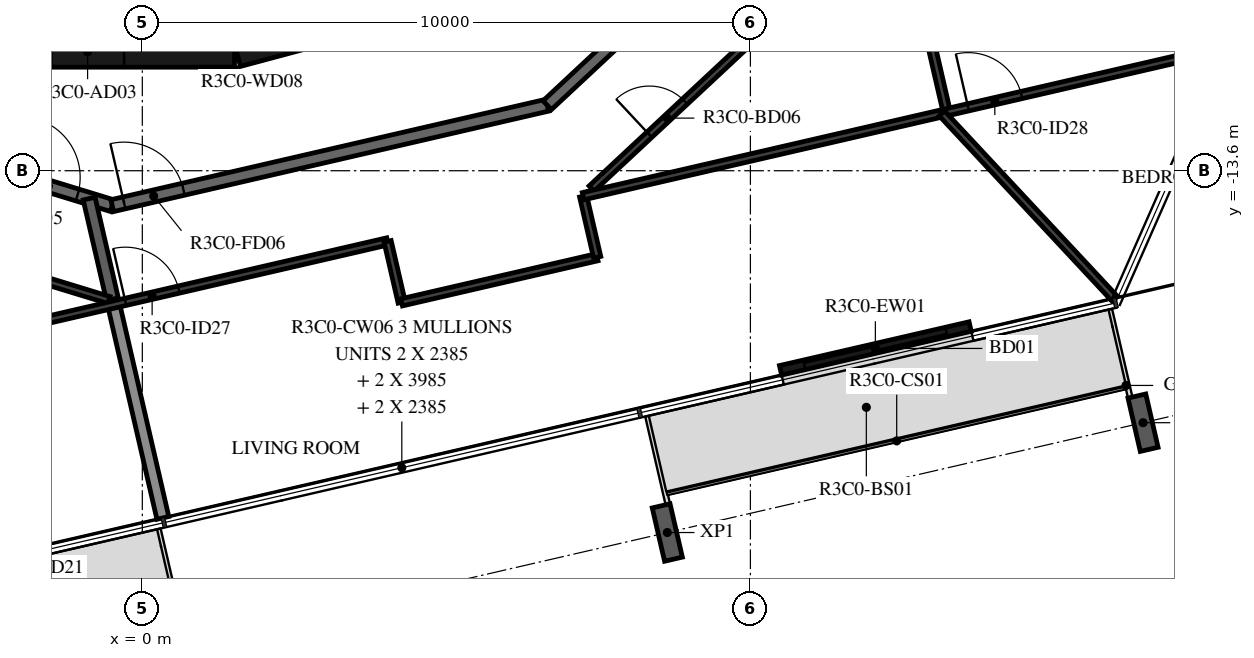
"""IFC4 building model, lengths in metres.
Left out: names, types, materials, properties, quantities, classifications, styles, units other than length and angle.
Written with IfcOpenShell. Run it as: python <this file> out.ifc"""

import sys

from ifc_helpers import new_model, si_unit, direction, frame, frame_2d, origin, origin_2d, place, context, subcontext, project, spatial, rectangle, i_section, extrude, element, fill, save


model = new_model("IFC4")
c1 = context("Model", 3, precision=1e-05, world=origin(), true_north=direction((0.0, 1.0)))
c2 = subcontext(c1, "Body", "Model", "MODEL_VIEW")
j1 = project(units=[si_unit("LENGTHUNIT", "METRE"), si_unit("PLANEANGLEUNIT", "RADIAN")], contexts=[c1])
p1 = place(None, origin())
s1 = spatial("IfcSite", under=j1, at=p1, CompositionType="ELEMENT")
p2 = place(p1, origin())
s2 = spatial("IfcBuilding", under=s1, at=p2, CompositionType="ELEMENT")
p3 = place(p2, frame((0.0, 0.0, 134.4)))
s3 = spatial("IfcBuildingStorey", under=s2, at=p3, CompositionType="ELEMENT", Elevation=134.4)
for number, where, z_axis, x_axis in (
    (1, (8.634, -19.55, -0.38), (0.0, 0.0, 1.0), (-0.974, -0.225, 0.0)),
    (2, (16.457, -17.744, -0.38), (0.0, 0.0, 1.0), (-0.974, -0.225, 0.0)),
):
    element("IfcColumn", number, at=place(p3, frame(where, z_axis=z_axis, x_axis=x_axis)), inside=s3, PredefinedType="COLUMN", context=c2, shape_type="SweptSolid", body=[
        extrude(i_section(OverallWidth=0.3, OverallDepth=0.9, WebThickness=0.019, FlangeThickness=0.035, FilletRadius=0.03, at=origin_2d()), origin(), (0.0, 0.0, 1.0), 3.5),
    ])
p4 = place(p3, frame((10.496, -16.883, 0.0), z_axis=(0.0, 0.0, 1.0), x_axis=(0.974364187477, 0.224976510247, 0.0)))
e3 = element("IfcWall", 3, at=p4, inside=s3, PredefinedType="STANDARD", context=c2, shape_type="SweptSolid", body=[
    extrude(rectangle(XDim=3.2, YDim=0.16, at=frame_2d((1.6, 0.0))), origin(), (0.0, 0.0, 1.0), 3.12),
])
p5 = place(p4, frame((0.4, 0.0, 0.0)))
e4 = element("IfcOpeningElement", 4, at=p5, cuts=e3, PredefinedType="OPENING", context=c2, shape_type="SweptSolid", body=[
    extrude(rectangle(XDim=2.4, YDim=2.4, at=frame_2d((1.2, 1.2))), frame((0.0, 0.09, 0.0), z_axis=(0.0, -1.0, 0.0), x_axis=(1.0, 0.0, 0.0)), (0.0, 0.0, 1.0), 0.18),
])
p6 = place(p3, frame((1.55, -11.643, 0.0), z_axis=(0.0, 0.0, 1.0), x_axis=(0.965948410781, 0.258734743916, 0.0)))
e5 = element("IfcWall", 5, at=p6, inside=s3, PredefinedType="SHEAR", context=c2, shape_type="SweptSolid", body=[
    extrude(rectangle(XDim=3.033, YDim=0.5, at=frame_2d((1.516, 0.0))), origin(), (0.0, 0.0, 1.0), 3.12),
])
p7 = place(p6, frame((1.066, 0.0, 0.0)))
e6 = element("IfcOpeningElement", 6, at=p7, cuts=e5, PredefinedType="OPENING", context=c2, shape_type="SweptSolid", body=[
    extrude(rectangle(XDim=0.9, YDim=2.1, at=frame_2d((0.45, 1.05))), frame((0.0, 0.26, 0.0), z_axis=(0.0, -1.0, 0.0), x_axis=(1.0, 0.0, 0.0)), (0.0, 0.0, 1.0), 0.52),
])
p8 = place(p3, frame((-1.516, -11.647, 0.0), z_axis=(0.0, 0.0, 1.0), x_axis=(1.0, 0.0, 0.0)))
e7 = element("IfcWall", 7, at=p8, inside=s3, PredefinedType="SHEAR", context=c2, shape_type="SweptSolid", body=[
    extrude(rectangle(XDim=3.033, YDim=0.5, at=frame_2d((1.516, 0.0))), origin(), (0.0, 0.0, 1.0), 3.12),
])
p9 = place(p8, frame((0.016, 0.0, 0.0)))
e8 = element("IfcOpeningElement", 8, at=p9, cuts=e7, PredefinedType="OPENING", context=c2, shape_type="SweptSolid", body=[
    extrude(rectangle(XDim=1.2, YDim=2.1, at=frame_2d((0.6, 1.05))), frame((0.0, 0.26, 0.0), z_axis=(0.0, -1.0, 0.0), x_axis=(1.0, 0.0, 0.0)), (0.0, 0.0, 1.0), 0.52),
])
p10 = place(p3, frame((-7.516, -12.028, 0.0), z_axis=(0.0, 0.0, 1.0), x_axis=(0.956306642771, -0.292365533182, 0.0)))
e9 = element("IfcWall", 9, at=p10, inside=s3, PredefinedType="STANDARD", context=c2, shape_type="SweptSolid", body=[
    extrude(rectangle(XDim=7.342, YDim=0.2, at=frame_2d((3.671, 0.0))), origin(), (0.0, 0.0, 1.0), 3.12),
])
p11 = place(p10, frame((5.745, 0.0, 0.0)))
e10 = element("IfcOpeningElement", 10, at=p11, cuts=e9, PredefinedType="OPENING", context=c2, shape_type="SweptSolid", body=[
    extrude(rectangle(XDim=1.0, YDim=2.1, at=frame_2d((0.5, 1.05))), frame((0.0, 0.11, 0.0), z_axis=(0.0, -1.0, 0.0), x_axis=(1.0, 0.0, 0.0)), (0.0, 0.0, 1.0), 0.22),
])
p12 = place(p3, frame((-0.495, -14.175, 0.0), z_axis=(0.0, 0.0, 1.0), x_axis=(0.974376622151, 0.224922649383, 0.0)))
e11 = element("IfcWall", 11, at=p12, inside=s3, PredefinedType="STANDARD", context=c2, shape_type="SweptSolid", body=[
    extrude(rectangle(XDim=7.342, YDim=0.2, at=frame_2d((3.671, 0.0))), origin(), (0.0, 0.0, 1.0), 3.12),
])
p13 = place(p12, frame((0.2, 0.0, 0.0)))
e12 = element("IfcOpeningElement", 12, at=p13, cuts=e11, PredefinedType="OPENING", context=c2, shape_type="SweptSolid", body=[
    extrude(rectangle(XDim=1.0, YDim=2.1, at=frame_2d((0.5, 1.05))), frame((0.0, 0.11, 0.0), z_axis=(0.0, -1.0, 0.0), x_axis=(1.0, 0.0, 0.0)), (0.0, 0.0, 1.0), 0.22),
])
p14 = place(p3, frame((6.659, -12.523, 0.0), z_axis=(0.0, 0.0, 1.0), x_axis=(0.731350455479, 0.682001841105, 0.0)))
e13 = element("IfcWall", 13, at=p14, inside=s3, PredefinedType="STANDARD", context=c2, shape_type="SweptSolid", body=[
    extrude(rectangle(XDim=7.342, YDim=0.2, at=frame_2d((3.671, 0.0))), origin(), (0.0, 0.0, 1.0), 3.12),
])
p15 = place(p3, frame((-0.492, -15.713, 0.0), z_axis=(0.0, 0.0, 1.0), x_axis=(-0.224974992875, 0.97436453783, 0.0)))
e14 = element("IfcWall", 14, at=p15, inside=s3, PredefinedType="STANDARD", context=c2, shape_type="SweptSolid", body=[
    extrude(rectangle(XDim=1.698, YDim=0.2, at=frame_2d((0.849, 0.0))), origin(), (0.0, 0.0, 1.0), 3.12),
])
p16 = place(p3, frame((0.338, -19.31, 0.0), z_axis=(0.0, 0.0, 1.0), x_axis=(-0.224943703639, 0.9743717618, 0.0)))
e15 = element("IfcWall", 15, at=p16, inside=s3, PredefinedType="STANDARD", context=c2, shape_type="SweptSolid", body=[
    extrude(rectangle(XDim=3.6, YDim=0.2, at=frame_2d((1.8, 0.0))), origin(), (0.0, 0.0, 1.0), 2.73),
])
p17 = place(p3, frame((-7.804, -13.509, 0.0), z_axis=(0.0, 0.0, 1.0), x_axis=(0.956309088343, -0.292357533772, 0.0)))
e16 = element("IfcWall", 16, at=p17, inside=s3, PredefinedType="PARTITIONING", context=c2, shape_type="SweptSolid", body=[
    extrude(rectangle(XDim=7.586, YDim=0.12, at=frame_2d((3.793, 0.0))), origin(), (0.0, 0.0, 1.0), 3.12),
])
p18 = place(p17, frame((1.006, 0.0, 0.0)))
e17 = element("IfcOpeningElement", 17, at=p18, cuts=e16, PredefinedType="OPENING", context=c2, shape_type="SweptSolid", body=[
    extrude(rectangle(XDim=0.8, YDim=2.1, at=frame_2d((0.4, 1.05))), frame((0.0, 0.07, 0.0), z_axis=(0.0, -1.0, 0.0), x_axis=(1.0, 0.0, 0.0)), (0.0, 0.0, 1.0), 0.14),
])
p19 = place(p3, frame((-14.736, -19.095, 0.0), z_axis=(0.0, 0.0, 1.0), x_axis=(0.974368335243, 0.224958545682, 0.0)))
e18 = element("IfcWall", 18, at=p19, inside=s3, PredefinedType="PARTITIONING", context=c2, shape_type="SweptSolid", body=[
    extrude(rectangle(XDim=19.263, YDim=0.12, at=frame_2d((9.632, 0.0))), origin(), (0.0, 0.0, 1.0), 3.12),
])
p20 = place(p19, frame((2.993, 0.0, 0.0)))
e19 = element("IfcOpeningElement", 19, at=p20, cuts=e18, PredefinedType="OPENING", context=c2, shape_type="SweptSolid", body=[
    extrude(rectangle(XDim=0.9, YDim=2.1, at=frame_2d((0.45, 1.05))), frame((0.0, 0.07, 0.0), z_axis=(0.0, -1.0, 0.0), x_axis=(1.0, 0.0, 0.0)), (0.0, 0.0, 1.0), 0.14),
])
p21 = place(p19, frame((6.81, 0.0, 0.0)))
e20 = element("IfcOpeningElement", 20, at=p21, cuts=e18, PredefinedType="OPENING", context=c2, shape_type="SweptSolid", body=[
    extrude(rectangle(XDim=0.9, YDim=2.1, at=frame_2d((0.45, 1.05))), frame((0.0, 0.07, 0.0), z_axis=(0.0, -1.0, 0.0), x_axis=(1.0, 0.0, 0.0)), (0.0, 0.0, 1.0), 0.14),
])
p22 = place(p19, frame((0.2, 0.0, 0.0)))
e21 = element("IfcOpeningElement", 21, at=p22, cuts=e18, PredefinedType="OPENING", context=c2, shape_type="SweptSolid", body=[
    extrude(rectangle(XDim=0.9, YDim=2.1, at=frame_2d((0.45, 1.05))), frame((0.0, 0.07, 0.0), z_axis=(0.0, -1.0, 0.0), x_axis=(1.0, 0.0, 0.0)), (0.0, 0.0, 1.0), 0.14),
])
p23 = place(p19, frame((14.839, 0.0, 0.0)))
e22 = element("IfcOpeningElement", 22, at=p23, cuts=e18, PredefinedType="OPENING", context=c2, shape_type="SweptSolid", body=[
    extrude(rectangle(XDim=0.9, YDim=2.1, at=frame_2d((0.45, 1.05))), frame((0.0, 0.07, 0.0), z_axis=(0.0, -1.0, 0.0), x_axis=(1.0, 0.0, 0.0)), (0.0, 0.0, 1.0), 0.14),
])
p24 = place(p3, frame((4.034, -14.762, 0.0), z_axis=(0.0, 0.0, 1.0), x_axis=(0.224859506699, -0.974391195695, 0.0)))
e23 = element("IfcWall", 23, at=p24, inside=s3, PredefinedType="PARTITIONING", context=c2, shape_type="SweptSolid", body=[
    extrude(rectangle(XDim=1.029, YDim=0.12, at=frame_2d((0.515, 0.0))), origin(), (0.0, 0.0, 1.0), 3.12),
])
p25 = place(p3, frame((4.265, -15.765, 0.0), z_axis=(0.0, 0.0, 1.0), x_axis=(0.974382467056, 0.22489732745, 0.0)))
e24 = element("IfcWall", 24, at=p25, inside=s3, PredefinedType="PARTITIONING", context=c2, shape_type="SweptSolid", body=[
    extrude(rectangle(XDim=3.3, YDim=0.12, at=frame_2d((1.65, 0.0))), origin(), (0.0, 0.0, 1.0), 3.12),
])
p26 = place(p3, frame((7.481, -15.022, 0.0), z_axis=(0.0, 0.0, 1.0), x_axis=(-0.225084689316, 0.974339203068, 0.0)))
e25 = element("IfcWall", 25, at=p26, inside=s3, PredefinedType="PARTITIONING", context=c2, shape_type="SweptSolid", body=[
    extrude(rectangle(XDim=1.029, YDim=0.12, at=frame_2d((0.515, 0.0))), origin(), (0.0, 0.0, 1.0), 3.12),
])
p27 = place(p3, frame((7.388, -13.894, 0.0), z_axis=(0.0, 0.0, 1.0), x_axis=(0.731339966659, 0.682013088707, 0.0)))
e26 = element("IfcWall", 26, at=p27, inside=s3, PredefinedType="PARTITIONING", context=c2, shape_type="SweptSolid", body=[
    extrude(rectangle(XDim=6.899, YDim=0.12, at=frame_2d((3.45, 0.0))), origin(), (0.0, 0.0, 1.0), 3.12),
])
p28 = place(p27, frame((1.3, 0.0, 0.0)))
e27 = element("IfcOpeningElement", 27, at=p28, cuts=e26, PredefinedType="OPENING", context=c2, shape_type="SweptSolid", body=[
    extrude(rectangle(XDim=0.8, YDim=2.1, at=frame_2d((0.4, 1.05))), frame((0.0, 0.07, 0.0), z_axis=(0.0, -1.0, 0.0), x_axis=(1.0, 0.0, 0.0)), (0.0, 0.0, 1.0), 0.14),
])
p29 = place(p3, frame((12.434, -9.189, 0.0), z_axis=(0.0, 0.0, 1.0), x_axis=(0.224924972887, -0.974376085796, 0.0)))
e28 = element("IfcWall", 28, at=p29, inside=s3, PredefinedType="PARTITIONING", context=c2, shape_type="SweptSolid", body=[
    extrude(rectangle(XDim=3.541, YDim=0.12, at=frame_2d((1.771, 0.0))), origin(), (0.0, 0.0, 1.0), 3.12),
])
p30 = place(p3, frame((7.249, -14.02, 0.0), z_axis=(0.0, 0.0, 1.0), x_axis=(0.974369514697, 0.224953437023, 0.0)))
e29 = element("IfcWall", 29, at=p30, inside=s3, PredefinedType="PARTITIONING", context=c2, shape_type="SweptSolid", body=[
    extrude(rectangle(XDim=12.149, YDim=0.12, at=frame_2d((6.074, 0.0))), origin(), (0.0, 0.0, 1.0), 3.12),
])
p31 = place(p30, frame((6.498, 0.0, 0.0)))
e30 = element("IfcOpeningElement", 30, at=p31, cuts=e29, PredefinedType="OPENING", context=c2, shape_type="SweptSolid", body=[
    extrude(rectangle(XDim=0.9, YDim=2.1, at=frame_2d((0.45, 1.05))), frame((0.0, 0.07, 0.0), z_axis=(0.0, -1.0, 0.0), x_axis=(1.0, 0.0, 0.0)), (0.0, 0.0, 1.0), 0.14),
])
p32 = place(p3, frame((15.985, -15.698, 0.0), z_axis=(0.0, 0.0, 1.0), x_axis=(-0.681979185924, 0.731371581322, 0.0)))
e31 = element("IfcWall", 31, at=p32, inside=s3, PredefinedType="PARTITIONING", context=c2, shape_type="SweptSolid", body=[
    extrude(rectangle(XDim=4.157, YDim=0.12, at=frame_2d((2.079, 0.0))), origin(), (0.0, 0.0, 1.0), 3.12),
])
p33 = place(p5, origin())
e32 = element("IfcDoor", 32, at=p33, inside=s3, OperationType="DOUBLE_DOOR_SLIDING", PredefinedType="DOOR", context=c2, shape_type="SweptSolid", body=[
    extrude(rectangle(XDim=2.4, YDim=2.4, at=frame_2d((1.2, 1.2))), frame((0.0, 0.025, 0.0), z_axis=(0.0, -1.0, 0.0), x_axis=(1.0, 0.0, 0.0)), (0.0, 0.0, 1.0), 0.05),
])
fill(e4, e32)
p34 = place(p9, origin())
e33 = element("IfcDoor", 33, at=p34, inside=s3, OperationType="SINGLE_SWING_RIGHT", PredefinedType="DOOR", context=c2, shape_type="SweptSolid", body=[
    extrude(rectangle(XDim=1.2, YDim=2.1, at=frame_2d((0.6, 1.05))), frame((0.0, 0.025, 0.0), z_axis=(0.0, -1.0, 0.0), x_axis=(1.0, 0.0, 0.0)), (0.0, 0.0, 1.0), 0.05),
])
fill(e8, e33)
p35 = place(p11, origin())
e34 = element("IfcDoor", 34, at=p35, inside=s3, OperationType="SINGLE_SWING_LEFT", PredefinedType="DOOR", context=c2, shape_type="SweptSolid", body=[
    extrude(rectangle(XDim=1.0, YDim=2.1, at=frame_2d((0.5, 1.05))), frame((0.0, 0.025, 0.0), z_axis=(0.0, -1.0, 0.0), x_axis=(1.0, 0.0, 0.0)), (0.0, 0.0, 1.0), 0.05),
])
fill(e10, e34)
p36 = place(p13, origin())
e35 = element("IfcDoor", 35, at=p36, inside=s3, OperationType="SINGLE_SWING_LEFT", PredefinedType="DOOR", context=c2, shape_type="SweptSolid", body=[
    extrude(rectangle(XDim=1.0, YDim=2.1, at=frame_2d((0.5, 1.05))), frame((0.0, 0.025, 0.0), z_axis=(0.0, -1.0, 0.0), x_axis=(1.0, 0.0, 0.0)), (0.0, 0.0, 1.0), 0.05),
])
fill(e12, e35)
p37 = place(p23, origin())
e36 = element("IfcDoor", 36, at=p37, inside=s3, OperationType="SINGLE_SWING_LEFT", PredefinedType="DOOR", context=c2, shape_type="SweptSolid", body=[
    extrude(rectangle(XDim=0.9, YDim=2.1, at=frame_2d((0.45, 1.05))), frame((0.0, 0.025, 0.0), z_axis=(0.0, -1.0, 0.0), x_axis=(1.0, 0.0, 0.0)), (0.0, 0.0, 1.0), 0.05),
])
fill(e22, e36)
p38 = place(p28, origin())
e37 = element("IfcDoor", 37, at=p38, inside=s3, OperationType="SINGLE_SWING_RIGHT", PredefinedType="DOOR", context=c2, shape_type="SweptSolid", body=[
    extrude(rectangle(XDim=0.8, YDim=2.1, at=frame_2d((0.4, 1.05))), frame((0.0, 0.025, 0.0), z_axis=(0.0, -1.0, 0.0), x_axis=(1.0, 0.0, 0.0)), (0.0, 0.0, 1.0), 0.05),
])
fill(e27, e37)
p39 = place(p31, origin())
e38 = element("IfcDoor", 38, at=p39, inside=s3, OperationType="SINGLE_SWING_RIGHT", PredefinedType="DOOR", context=c2, shape_type="SweptSolid", body=[
    extrude(rectangle(XDim=0.9, YDim=2.1, at=frame_2d((0.45, 1.05))), frame((0.0, 0.025, 0.0), z_axis=(0.0, -1.0, 0.0), x_axis=(1.0, 0.0, 0.0)), (0.0, 0.0, 1.0), 0.05),
])
fill(e30, e38)
save(model, sys.argv[1])
